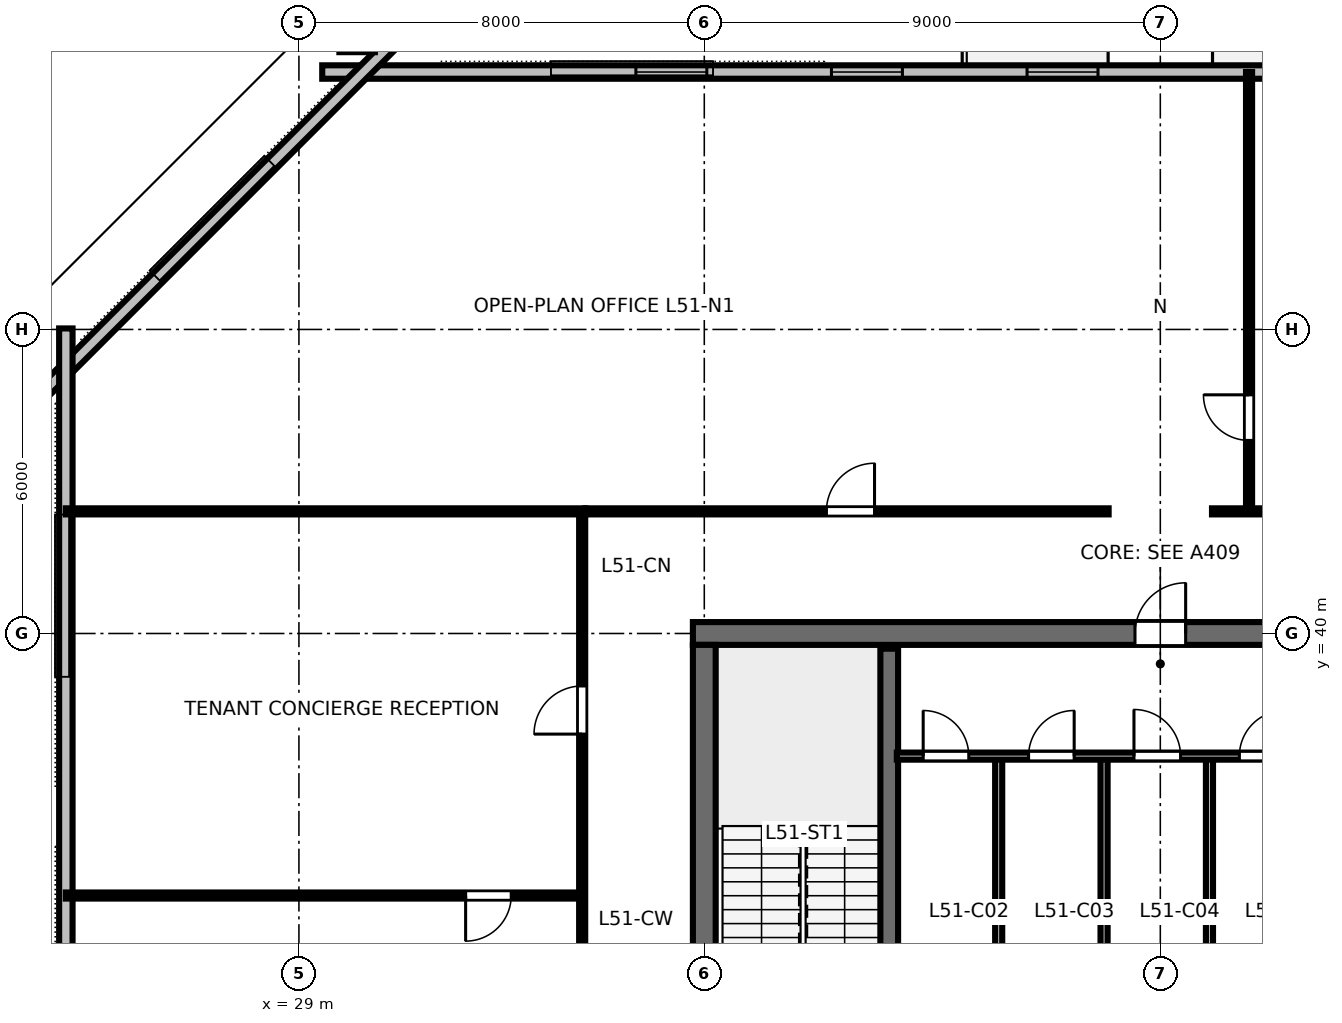
"""IFC4 building model, lengths in metres.
Left out: names, types, materials, properties, quantities, classifications, styles, units other than length and angle.
Written with IfcOpenShell. Run it as: python <this file> out.ifc"""

import sys

from ifc_helpers import new_model, si_unit, direction, frame, frame_2d, origin, origin_2d, place, context, subcontext, project, spatial, rectangle, hollow_rectangle, i_section, extrude, element, fill, save


model = new_model("IFC4")
c1 = context("Model", 3, precision=1e-05, world=origin(), true_north=direction((0.0, 1.0)))
c2 = subcontext(c1, "Body", "Model", "MODEL_VIEW")
j1 = project(units=[si_unit("LENGTHUNIT", "METRE"), si_unit("PLANEANGLEUNIT", "RADIAN")], contexts=[c1])
p1 = place(None, origin())
s1 = spatial("IfcSite", under=j1, at=p1, CompositionType="ELEMENT")
p2 = place(p1, origin())
s2 = spatial("IfcBuilding", under=s1, at=p2, CompositionType="ELEMENT")
p3 = place(p2, frame((0.0, 0.0, 195.0)))
s3 = spatial("IfcBuildingStorey", under=s2, at=p3, CompositionType="ELEMENT", Elevation=195.0)
p4 = place(p3, frame((36.775, 40.0, 0.0), z_axis=(0.0, 0.0, 1.0), x_axis=(1.0, 0.0, 0.0)))
e1 = element("IfcWall", 1, at=p4, inside=s3, PredefinedType="SHEAR", context=c2, shape_type="SweptSolid", body=[
    extrude(rectangle(XDim=18.45, YDim=0.45, at=frame_2d((9.225, 0.0))), origin(), (0.0, 0.0, 1.0), 3.36),
])
p5 = place(p4, frame((8.725, 0.0, 0.0)))
e2 = element("IfcOpeningElement", 2, at=p5, cuts=e1, PredefinedType="OPENING", context=c2, shape_type="SweptSolid", body=[
    extrude(rectangle(XDim=1.0, YDim=2.15, at=frame_2d((0.5, 1.075))), frame((0.0, 0.235, 0.0), z_axis=(0.0, -1.0, 0.0), x_axis=(1.0, 0.0, 0.0)), (0.0, 0.0, 1.0), 0.47),
])
p6 = place(p3, frame((37.0, 24.225, 0.0), z_axis=(0.0, 0.0, 1.0), x_axis=(0.0, 1.0, 0.0)))
e3 = element("IfcWall", 3, at=p6, inside=s3, PredefinedType="SHEAR", context=c2, shape_type="SweptSolid", body=[
    extrude(rectangle(XDim=15.55, YDim=0.45, at=frame_2d((7.775, 0.0))), origin(), (0.0, 0.0, 1.0), 3.36),
])
p7 = place(p6, frame((5.3, 0.0, 0.0)))
e4 = element("IfcOpeningElement", 4, at=p7, cuts=e3, PredefinedType="OPENING", context=c2, shape_type="SweptSolid", body=[
    extrude(rectangle(XDim=1.15, YDim=2.15, at=frame_2d((0.575, 1.075))), frame((0.0, 0.235, 0.0), z_axis=(0.0, -1.0, 0.0), x_axis=(1.0, 0.0, 0.0)), (0.0, 0.0, 1.0), 0.47),
])
p8 = place(p3, frame((46.0, 51.74, 0.0), z_axis=(0.0, -0.192002682774, 0.981394400742), x_axis=(1.0, 0.0, 0.0)))
e5 = element("IfcColumn", 5, at=p8, inside=s3, PredefinedType="COLUMN", context=c2, shape_type="SweptSolid", body=[
    extrude(i_section(OverallWidth=0.401, OverallDepth=0.399, WebThickness=0.025, FlangeThickness=0.04, FilletRadius=0.025, at=origin_2d()), origin(), (0.0, 0.0, 1.0), 3.437),
])
p9 = place(p3, frame((30.149, 51.897, 0.0), z_axis=(0.251481665301, -0.187288203866, 0.949568376006), x_axis=(0.597296145547, 0.802020769379, 0.0)))
e6 = element("IfcColumn", 6, at=p9, inside=s3, PredefinedType="COLUMN", context=c2, shape_type="SweptSolid", body=[
    extrude(hollow_rectangle(XDim=0.7, YDim=0.85, WallThickness=0.04, at=origin_2d()), origin(), (0.0, 0.0, 1.0), 3.552),
])
p10 = place(p3, frame((23.637, 45.41, 0.0), z_axis=(0.220934706476, -0.217976066682, 0.950617846365), x_axis=(-0.676704084266, 0.667642023966, 0.310363835155)))
e7 = element("IfcColumn", 7, at=p10, inside=s3, PredefinedType="COLUMN", context=c2, shape_type="SweptSolid", body=[
    extrude(hollow_rectangle(XDim=0.7, YDim=0.85, WallThickness=0.04, at=origin_2d()), origin(), (0.0, 0.0, 1.0), 3.548),
])
p11 = place(p3, frame((62.54, 51.08, 0.0), z_axis=(0.0, 0.0, 1.0), x_axis=(-1.0, 0.0, 0.0)))
e8 = element("IfcWall", 8, at=p11, inside=s3, PredefinedType="STANDARD", context=c2, shape_type="SweptSolid", body=[
    extrude(rectangle(XDim=33.08, YDim=0.265, at=frame_2d((16.54, 0.0))), origin(), (0.0, 0.0, 1.0), 2.832),
])
p12 = place(p11, frame((12.86, 0.0, 0.0)))
e9 = element("IfcOpeningElement", 9, at=p12, cuts=e8, PredefinedType="OPENING", context=c2, shape_type="SweptSolid", body=[
    extrude(rectangle(XDim=1.4, YDim=2.15, at=frame_2d((0.7, 1.075))), frame((0.0, 0.142, 0.0), z_axis=(0.0, -1.0, 0.0), x_axis=(1.0, 0.0, 0.0)), (0.0, 0.0, 1.0), 0.285),
])
p13 = place(p11, frame((6.19, 0.0, 0.85)))
e10 = element("IfcOpeningElement", 10, at=p13, cuts=e8, PredefinedType="OPENING", context=c2, shape_type="SweptSolid", body=[
    extrude(rectangle(XDim=1.4, YDim=1.2, at=frame_2d((0.7, 0.6))), frame((0.0, 0.142, 0.0), z_axis=(0.0, -1.0, 0.0), x_axis=(1.0, 0.0, 0.0)), (0.0, 0.0, 1.0), 0.285),
])
p14 = place(p11, frame((10.05, 0.0, 0.85)))
e11 = element("IfcOpeningElement", 11, at=p14, cuts=e8, PredefinedType="OPENING", context=c2, shape_type="SweptSolid", body=[
    extrude(rectangle(XDim=1.4, YDim=1.2, at=frame_2d((0.7, 0.6))), frame((0.0, 0.142, 0.0), z_axis=(0.0, -1.0, 0.0), x_axis=(1.0, 0.0, 0.0)), (0.0, 0.0, 1.0), 0.285),
])
p15 = place(p11, frame((17.77, 0.0, 0.85)))
e12 = element("IfcOpeningElement", 12, at=p15, cuts=e8, PredefinedType="OPENING", context=c2, shape_type="SweptSolid", body=[
    extrude(rectangle(XDim=1.4, YDim=1.2, at=frame_2d((0.7, 0.6))), frame((0.0, 0.142, 0.0), z_axis=(0.0, -1.0, 0.0), x_axis=(1.0, 0.0, 0.0)), (0.0, 0.0, 1.0), 0.285),
])
p16 = place(p11, frame((21.63, 0.0, 0.85)))
e13 = element("IfcOpeningElement", 13, at=p16, cuts=e8, PredefinedType="OPENING", context=c2, shape_type="SweptSolid", body=[
    extrude(rectangle(XDim=1.4, YDim=1.2, at=frame_2d((0.7, 0.6))), frame((0.0, 0.142, 0.0), z_axis=(0.0, -1.0, 0.0), x_axis=(1.0, 0.0, 0.0)), (0.0, 0.0, 1.0), 0.285),
])
p17 = place(p11, frame((25.49, 0.0, 0.85)))
e14 = element("IfcOpeningElement", 14, at=p17, cuts=e8, PredefinedType="OPENING", context=c2, shape_type="SweptSolid", body=[
    extrude(rectangle(XDim=1.4, YDim=1.2, at=frame_2d((0.7, 0.6))), frame((0.0, 0.142, 0.0), z_axis=(0.0, -1.0, 0.0), x_axis=(1.0, 0.0, 0.0)), (0.0, 0.0, 1.0), 0.285),
])
p18 = place(p3, frame((30.845, 51.654, 0.0), z_axis=(0.0, 0.0, 1.0), x_axis=(-0.707106781187, -0.707106781187, 0.0)))
e15 = element("IfcWall", 15, at=p18, inside=s3, PredefinedType="STANDARD", context=c2, shape_type="SweptSolid", body=[
    extrude(rectangle(XDim=9.927, YDim=0.265, at=frame_2d((4.963, 0.0))), origin(), (0.0, 0.0, 1.0), 3.375),
])
p19 = place(p3, frame((24.4, 46.02, 0.0), z_axis=(0.0, 0.0, 1.0), x_axis=(0.0, -1.0, 0.0)))
e16 = element("IfcWall", 16, at=p19, inside=s3, PredefinedType="STANDARD", context=c2, shape_type="SweptSolid", body=[
    extrude(rectangle(XDim=28.04, YDim=0.265, at=frame_2d((14.02, 0.0))), origin(), (0.0, 0.0, 1.0), 2.832),
])
p20 = place(p3, frame((40.65, 32.0, 0.0), z_axis=(0.0, 0.0, 1.0), x_axis=(0.0, 1.0, 0.0)))
e17 = element("IfcWall", 17, at=p20, inside=s3, PredefinedType="SHEAR", context=c2, shape_type="SweptSolid", body=[
    extrude(rectangle(XDim=7.7, YDim=0.35, at=frame_2d((3.85, 0.0))), origin(), (0.0, 0.0, 1.0), 3.6),
])
for number, where, z_axis, x_axis in (
    (18, (42.81, 32.05, 0.0), (0.0, 0.0, 1.0), (0.0, 1.0, 0.0)),
    (19, (44.89, 32.05, 0.0), (0.0, 0.0, 1.0), (0.0, 1.0, 0.0)),
    (20, (46.97, 32.05, 0.0), (0.0, 0.0, 1.0), (0.0, 1.0, 0.0)),
):
    element("IfcWall", number, at=place(p3, frame(where, z_axis=z_axis, x_axis=x_axis)), inside=s3, PredefinedType="PARTITIONING", context=c2, shape_type="SweptSolid", body=[
        extrude(rectangle(XDim=5.5, YDim=0.14, at=frame_2d((2.75, 0.0))), origin(), (0.0, 0.0, 1.0), 3.375),
    ])
p21 = place(p3, frame((40.8, 37.58, 0.0), z_axis=(0.0, 0.0, 1.0), x_axis=(1.0, 0.0, 0.0)))
e21 = element("IfcWall", 21, at=p21, inside=s3, PredefinedType="PARTITIONING", context=c2, shape_type="SweptSolid", body=[
    extrude(rectangle(XDim=10.4, YDim=0.14, at=frame_2d((5.2, 0.0))), origin(), (0.0, 0.0, 1.0), 3.375),
])
p22 = place(p21, frame((0.52, 0.0, 0.0)))
e22 = element("IfcOpeningElement", 22, at=p22, cuts=e21, PredefinedType="OPENING", context=c2, shape_type="SweptSolid", body=[
    extrude(rectangle(XDim=0.9, YDim=2.15, at=frame_2d((0.45, 1.075))), frame((0.0, 0.08, 0.0), z_axis=(0.0, -1.0, 0.0), x_axis=(1.0, 0.0, 0.0)), (0.0, 0.0, 1.0), 0.16),
])
p23 = place(p21, frame((2.6, 0.0, 0.0)))
e23 = element("IfcOpeningElement", 23, at=p23, cuts=e21, PredefinedType="OPENING", context=c2, shape_type="SweptSolid", body=[
    extrude(rectangle(XDim=0.9, YDim=2.15, at=frame_2d((0.45, 1.075))), frame((0.0, 0.08, 0.0), z_axis=(0.0, -1.0, 0.0), x_axis=(1.0, 0.0, 0.0)), (0.0, 0.0, 1.0), 0.16),
])
p24 = place(p21, frame((4.68, 0.0, 0.0)))
e24 = element("IfcOpeningElement", 24, at=p24, cuts=e21, PredefinedType="OPENING", context=c2, shape_type="SweptSolid", body=[
    extrude(rectangle(XDim=0.92, YDim=2.15, at=frame_2d((0.46, 1.075))), frame((0.0, 0.08, 0.0), z_axis=(0.0, -1.0, 0.0), x_axis=(1.0, 0.0, 0.0)), (0.0, 0.0, 1.0), 0.16),
])
p25 = place(p21, frame((6.76, 0.0, 0.0)))
e25 = element("IfcOpeningElement", 25, at=p25, cuts=e21, PredefinedType="OPENING", context=c2, shape_type="SweptSolid", body=[
    extrude(rectangle(XDim=0.9, YDim=2.15, at=frame_2d((0.45, 1.075))), frame((0.0, 0.08, 0.0), z_axis=(0.0, -1.0, 0.0), x_axis=(1.0, 0.0, 0.0)), (0.0, 0.0, 1.0), 0.16),
])
p26 = place(p21, frame((8.84, 0.0, 0.0)))
e26 = element("IfcOpeningElement", 26, at=p26, cuts=e21, PredefinedType="OPENING", context=c2, shape_type="SweptSolid", body=[
    extrude(rectangle(XDim=0.9, YDim=2.15, at=frame_2d((0.45, 1.075))), frame((0.0, 0.08, 0.0), z_axis=(0.0, -1.0, 0.0), x_axis=(1.0, 0.0, 0.0)), (0.0, 0.0, 1.0), 0.16),
])
p27 = place(p3, frame((47.751, 42.41, 0.0), z_axis=(0.0, 0.0, 1.0), x_axis=(0.0, 1.0, 0.0)))
e27 = element("IfcWall", 27, at=p27, inside=s3, PredefinedType="PARTITIONING", context=c2, shape_type="SweptSolid", body=[
    extrude(rectangle(XDim=8.67, YDim=0.12, at=frame_2d((4.335, 0.0))), origin(), (0.0, 0.0, 1.0), 2.655),
])
p28 = place(p27, frame((1.4, 0.0, 0.0)))
e28 = element("IfcOpeningElement", 28, at=p28, cuts=e27, PredefinedType="OPENING", context=c2, shape_type="SweptSolid", body=[
    extrude(rectangle(XDim=0.9, YDim=2.15, at=frame_2d((0.45, 1.075))), frame((0.0, 0.07, 0.0), z_axis=(0.0, -1.0, 0.0), x_axis=(1.0, 0.0, 0.0)), (0.0, 0.0, 1.0), 0.14),
])
p29 = place(p3, frame((34.65, 42.41, 0.0), z_axis=(0.0, 0.0, 1.0), x_axis=(1.0, 0.0, 0.0)))
e29 = element("IfcWall", 29, at=p29, inside=s3, PredefinedType="PARTITIONING", context=c2, shape_type="SweptSolid", body=[
    extrude(rectangle(XDim=10.33, YDim=0.12, at=frame_2d((5.165, 0.0))), origin(), (0.0, 0.0, 1.0), 2.655),
])
p30 = place(p29, frame((4.76, 0.0, 0.0)))
e30 = element("IfcOpeningElement", 30, at=p30, cuts=e29, PredefinedType="OPENING", context=c2, shape_type="SweptSolid", body=[
    extrude(rectangle(XDim=0.95, YDim=2.15, at=frame_2d((0.475, 1.075))), frame((0.0, 0.07, 0.0), z_axis=(0.0, -1.0, 0.0), x_axis=(1.0, 0.0, 0.0)), (0.0, 0.0, 1.0), 0.14),
])
p31 = place(p3, frame((47.02, 42.41, 0.0), z_axis=(0.0, 0.0, 1.0), x_axis=(1.0, 0.0, 0.0)))
e31 = element("IfcWall", 31, at=p31, inside=s3, PredefinedType="PARTITIONING", context=c2, shape_type="SweptSolid", body=[
    extrude(rectangle(XDim=10.33, YDim=0.12, at=frame_2d((5.165, 0.0))), origin(), (0.0, 0.0, 1.0), 2.655),
])
p32 = place(p31, frame((4.986, 0.0, 0.0)))
e32 = element("IfcOpeningElement", 32, at=p32, cuts=e31, PredefinedType="OPENING", context=c2, shape_type="SweptSolid", body=[
    extrude(rectangle(XDim=0.95, YDim=2.15, at=frame_2d((0.475, 1.075))), frame((0.0, 0.07, 0.0), z_axis=(0.0, -1.0, 0.0), x_axis=(1.0, 0.0, 0.0)), (0.0, 0.0, 1.0), 0.14),
])
p33 = place(p3, frame((34.59, 34.829, 0.0), z_axis=(0.0, 0.0, 1.0), x_axis=(-1.0, 0.0, 0.0)))
e33 = element("IfcWall", 33, at=p33, inside=s3, PredefinedType="PARTITIONING", context=c2, shape_type="SweptSolid", body=[
    extrude(rectangle(XDim=10.19, YDim=0.12, at=frame_2d((5.095, 0.0))), origin(), (0.0, 0.0, 1.0), 2.655),
])
p34 = place(p33, frame((1.4, 0.0, 0.0)))
e34 = element("IfcOpeningElement", 34, at=p34, cuts=e33, PredefinedType="OPENING", context=c2, shape_type="SweptSolid", body=[
    extrude(rectangle(XDim=0.9, YDim=2.15, at=frame_2d((0.45, 1.075))), frame((0.0, 0.07, 0.0), z_axis=(0.0, -1.0, 0.0), x_axis=(1.0, 0.0, 0.0)), (0.0, 0.0, 1.0), 0.14),
])
p35 = place(p3, frame((34.59, 21.65, 0.0), z_axis=(0.0, 0.0, 1.0), x_axis=(0.0, 1.0, 0.0)))
e35 = element("IfcWall", 35, at=p35, inside=s3, PredefinedType="PARTITIONING", context=c2, shape_type="SweptSolid", body=[
    extrude(rectangle(XDim=20.7, YDim=0.12, at=frame_2d((10.35, 0.0))), origin(), (0.0, 0.0, 1.0), 2.655),
])
p36 = place(p35, frame((6.214, 0.0, 0.0)))
e36 = element("IfcOpeningElement", 36, at=p36, cuts=e35, PredefinedType="OPENING", context=c2, shape_type="SweptSolid", body=[
    extrude(rectangle(XDim=0.95, YDim=2.15, at=frame_2d((0.475, 1.075))), frame((0.0, 0.07, 0.0), z_axis=(0.0, -1.0, 0.0), x_axis=(1.0, 0.0, 0.0)), (0.0, 0.0, 1.0), 0.14),
])
p37 = place(p35, frame((16.365, 0.0, 0.0)))
e37 = element("IfcOpeningElement", 37, at=p37, cuts=e35, PredefinedType="OPENING", context=c2, shape_type="SweptSolid", body=[
    extrude(rectangle(XDim=0.95, YDim=2.15, at=frame_2d((0.475, 1.075))), frame((0.0, 0.07, 0.0), z_axis=(0.0, -1.0, 0.0), x_axis=(1.0, 0.0, 0.0)), (0.0, 0.0, 1.0), 0.14),
])
p38 = place(p3, frame((34.65, 42.41, 0.0), z_axis=(0.0, 0.0, 1.0), x_axis=(-1.0, 0.0, 0.0)))
e38 = element("IfcWall", 38, at=p38, inside=s3, PredefinedType="PARTITIONING", context=c2, shape_type="SweptSolid", body=[
    extrude(rectangle(XDim=10.25, YDim=0.12, at=frame_2d((5.125, 0.0))), origin(), (0.0, 0.0, 1.0), 2.655),
])
p39 = place(p15, origin())
e39 = element("IfcWindow", 39, at=p39, inside=s3, PartitioningType="SINGLE_PANEL", PredefinedType="WINDOW", context=c2, shape_type="SweptSolid", body=[
    extrude(rectangle(XDim=1.4, YDim=1.2, at=frame_2d((0.7, 0.6))), frame((0.0, 0.03, 0.0), z_axis=(0.0, -1.0, 0.0), x_axis=(1.0, 0.0, 0.0)), (0.0, 0.0, 1.0), 0.06),
])
fill(e12, e39)
p40 = place(p16, origin())
e40 = element("IfcWindow", 40, at=p40, inside=s3, PartitioningType="SINGLE_PANEL", PredefinedType="WINDOW", context=c2, shape_type="SweptSolid", body=[
    extrude(rectangle(XDim=1.4, YDim=1.2, at=frame_2d((0.7, 0.6))), frame((0.0, 0.03, 0.0), z_axis=(0.0, -1.0, 0.0), x_axis=(1.0, 0.0, 0.0)), (0.0, 0.0, 1.0), 0.06),
])
fill(e13, e40)
p41 = place(p17, origin())
e41 = element("IfcWindow", 41, at=p41, inside=s3, PartitioningType="SINGLE_PANEL", PredefinedType="WINDOW", context=c2, shape_type="SweptSolid", body=[
    extrude(rectangle(XDim=1.4, YDim=1.2, at=frame_2d((0.7, 0.6))), frame((0.0, 0.03, 0.0), z_axis=(0.0, -1.0, 0.0), x_axis=(1.0, 0.0, 0.0)), (0.0, 0.0, 1.0), 0.06),
])
fill(e14, e41)
p42 = place(p5, origin())
e42 = element("IfcDoor", 42, at=p42, inside=s3, OperationType="SINGLE_SWING_RIGHT", PredefinedType="DOOR", context=c2, shape_type="SweptSolid", body=[
    extrude(rectangle(XDim=1.0, YDim=2.15, at=frame_2d((0.5, 1.075))), frame((0.0, 0.025, 0.0), z_axis=(0.0, -1.0, 0.0), x_axis=(1.0, 0.0, 0.0)), (0.0, 0.0, 1.0), 0.05),
])
fill(e2, e42)
p43 = place(p22, origin())
e43 = element("IfcDoor", 43, at=p43, inside=s3, OperationType="SINGLE_SWING_LEFT", PredefinedType="DOOR", context=c2, shape_type="SweptSolid", body=[
    extrude(rectangle(XDim=0.9, YDim=2.15, at=frame_2d((0.45, 1.075))), frame((0.0, 0.025, 0.0), z_axis=(0.0, -1.0, 0.0), x_axis=(1.0, 0.0, 0.0)), (0.0, 0.0, 1.0), 0.05),
])
fill(e22, e43)
p44 = place(p23, origin())
e44 = element("IfcDoor", 44, at=p44, inside=s3, OperationType="SINGLE_SWING_RIGHT", PredefinedType="DOOR", context=c2, shape_type="SweptSolid", body=[
    extrude(rectangle(XDim=0.9, YDim=2.15, at=frame_2d((0.45, 1.075))), frame((0.0, 0.025, 0.0), z_axis=(0.0, -1.0, 0.0), x_axis=(1.0, 0.0, 0.0)), (0.0, 0.0, 1.0), 0.05),
])
fill(e23, e44)
p45 = place(p24, origin())
e45 = element("IfcDoor", 45, at=p45, inside=s3, OperationType="SINGLE_SWING_LEFT", PredefinedType="DOOR", context=c2, shape_type="SweptSolid", body=[
    extrude(rectangle(XDim=0.92, YDim=2.15, at=frame_2d((0.46, 1.075))), frame((0.0, 0.025, 0.0), z_axis=(0.0, -1.0, 0.0), x_axis=(1.0, 0.0, 0.0)), (0.0, 0.0, 1.0), 0.05),
])
fill(e24, e45)
p46 = place(p25, origin())
e46 = element("IfcDoor", 46, at=p46, inside=s3, OperationType="SINGLE_SWING_RIGHT", PredefinedType="DOOR", context=c2, shape_type="SweptSolid", body=[
    extrude(rectangle(XDim=0.9, YDim=2.15, at=frame_2d((0.45, 1.075))), frame((0.0, 0.025, 0.0), z_axis=(0.0, -1.0, 0.0), x_axis=(1.0, 0.0, 0.0)), (0.0, 0.0, 1.0), 0.05),
])
fill(e25, e46)
p47 = place(p28, origin())
e47 = element("IfcDoor", 47, at=p47, inside=s3, OperationType="SINGLE_SWING_RIGHT", PredefinedType="DOOR", context=c2, shape_type="SweptSolid", body=[
    extrude(rectangle(XDim=0.9, YDim=2.15, at=frame_2d((0.45, 1.075))), frame((0.0, 0.025, 0.0), z_axis=(0.0, -1.0, 0.0), x_axis=(1.0, 0.0, 0.0)), (0.0, 0.0, 1.0), 0.05),
])
fill(e28, e47)
p48 = place(p30, origin())
e48 = element("IfcDoor", 48, at=p48, inside=s3, OperationType="SINGLE_SWING_RIGHT", PredefinedType="DOOR", context=c2, shape_type="SweptSolid", body=[
    extrude(rectangle(XDim=0.95, YDim=2.15, at=frame_2d((0.475, 1.075))), frame((0.0, 0.025, 0.0), z_axis=(0.0, -1.0, 0.0), x_axis=(1.0, 0.0, 0.0)), (0.0, 0.0, 1.0), 0.05),
])
fill(e30, e48)
p49 = place(p34, origin())
e49 = element("IfcDoor", 49, at=p49, inside=s3, OperationType="SINGLE_SWING_RIGHT", PredefinedType="DOOR", context=c2, shape_type="SweptSolid", body=[
    extrude(rectangle(XDim=0.9, YDim=2.15, at=frame_2d((0.45, 1.075))), frame((0.0, 0.025, 0.0), z_axis=(0.0, -1.0, 0.0), x_axis=(1.0, 0.0, 0.0)), (0.0, 0.0, 1.0), 0.05),
])
fill(e34, e49)
p50 = place(p37, origin())
e50 = element("IfcDoor", 50, at=p50, inside=s3, OperationType="SINGLE_SWING_LEFT", PredefinedType="DOOR", context=c2, shape_type="SweptSolid", body=[
    extrude(rectangle(XDim=0.95, YDim=2.15, at=frame_2d((0.475, 1.075))), frame((0.0, 0.025, 0.0), z_axis=(0.0, -1.0, 0.0), x_axis=(1.0, 0.0, 0.0)), (0.0, 0.0, 1.0), 0.05),
])
fill(e37, e50)
save(model, sys.argv[1])
